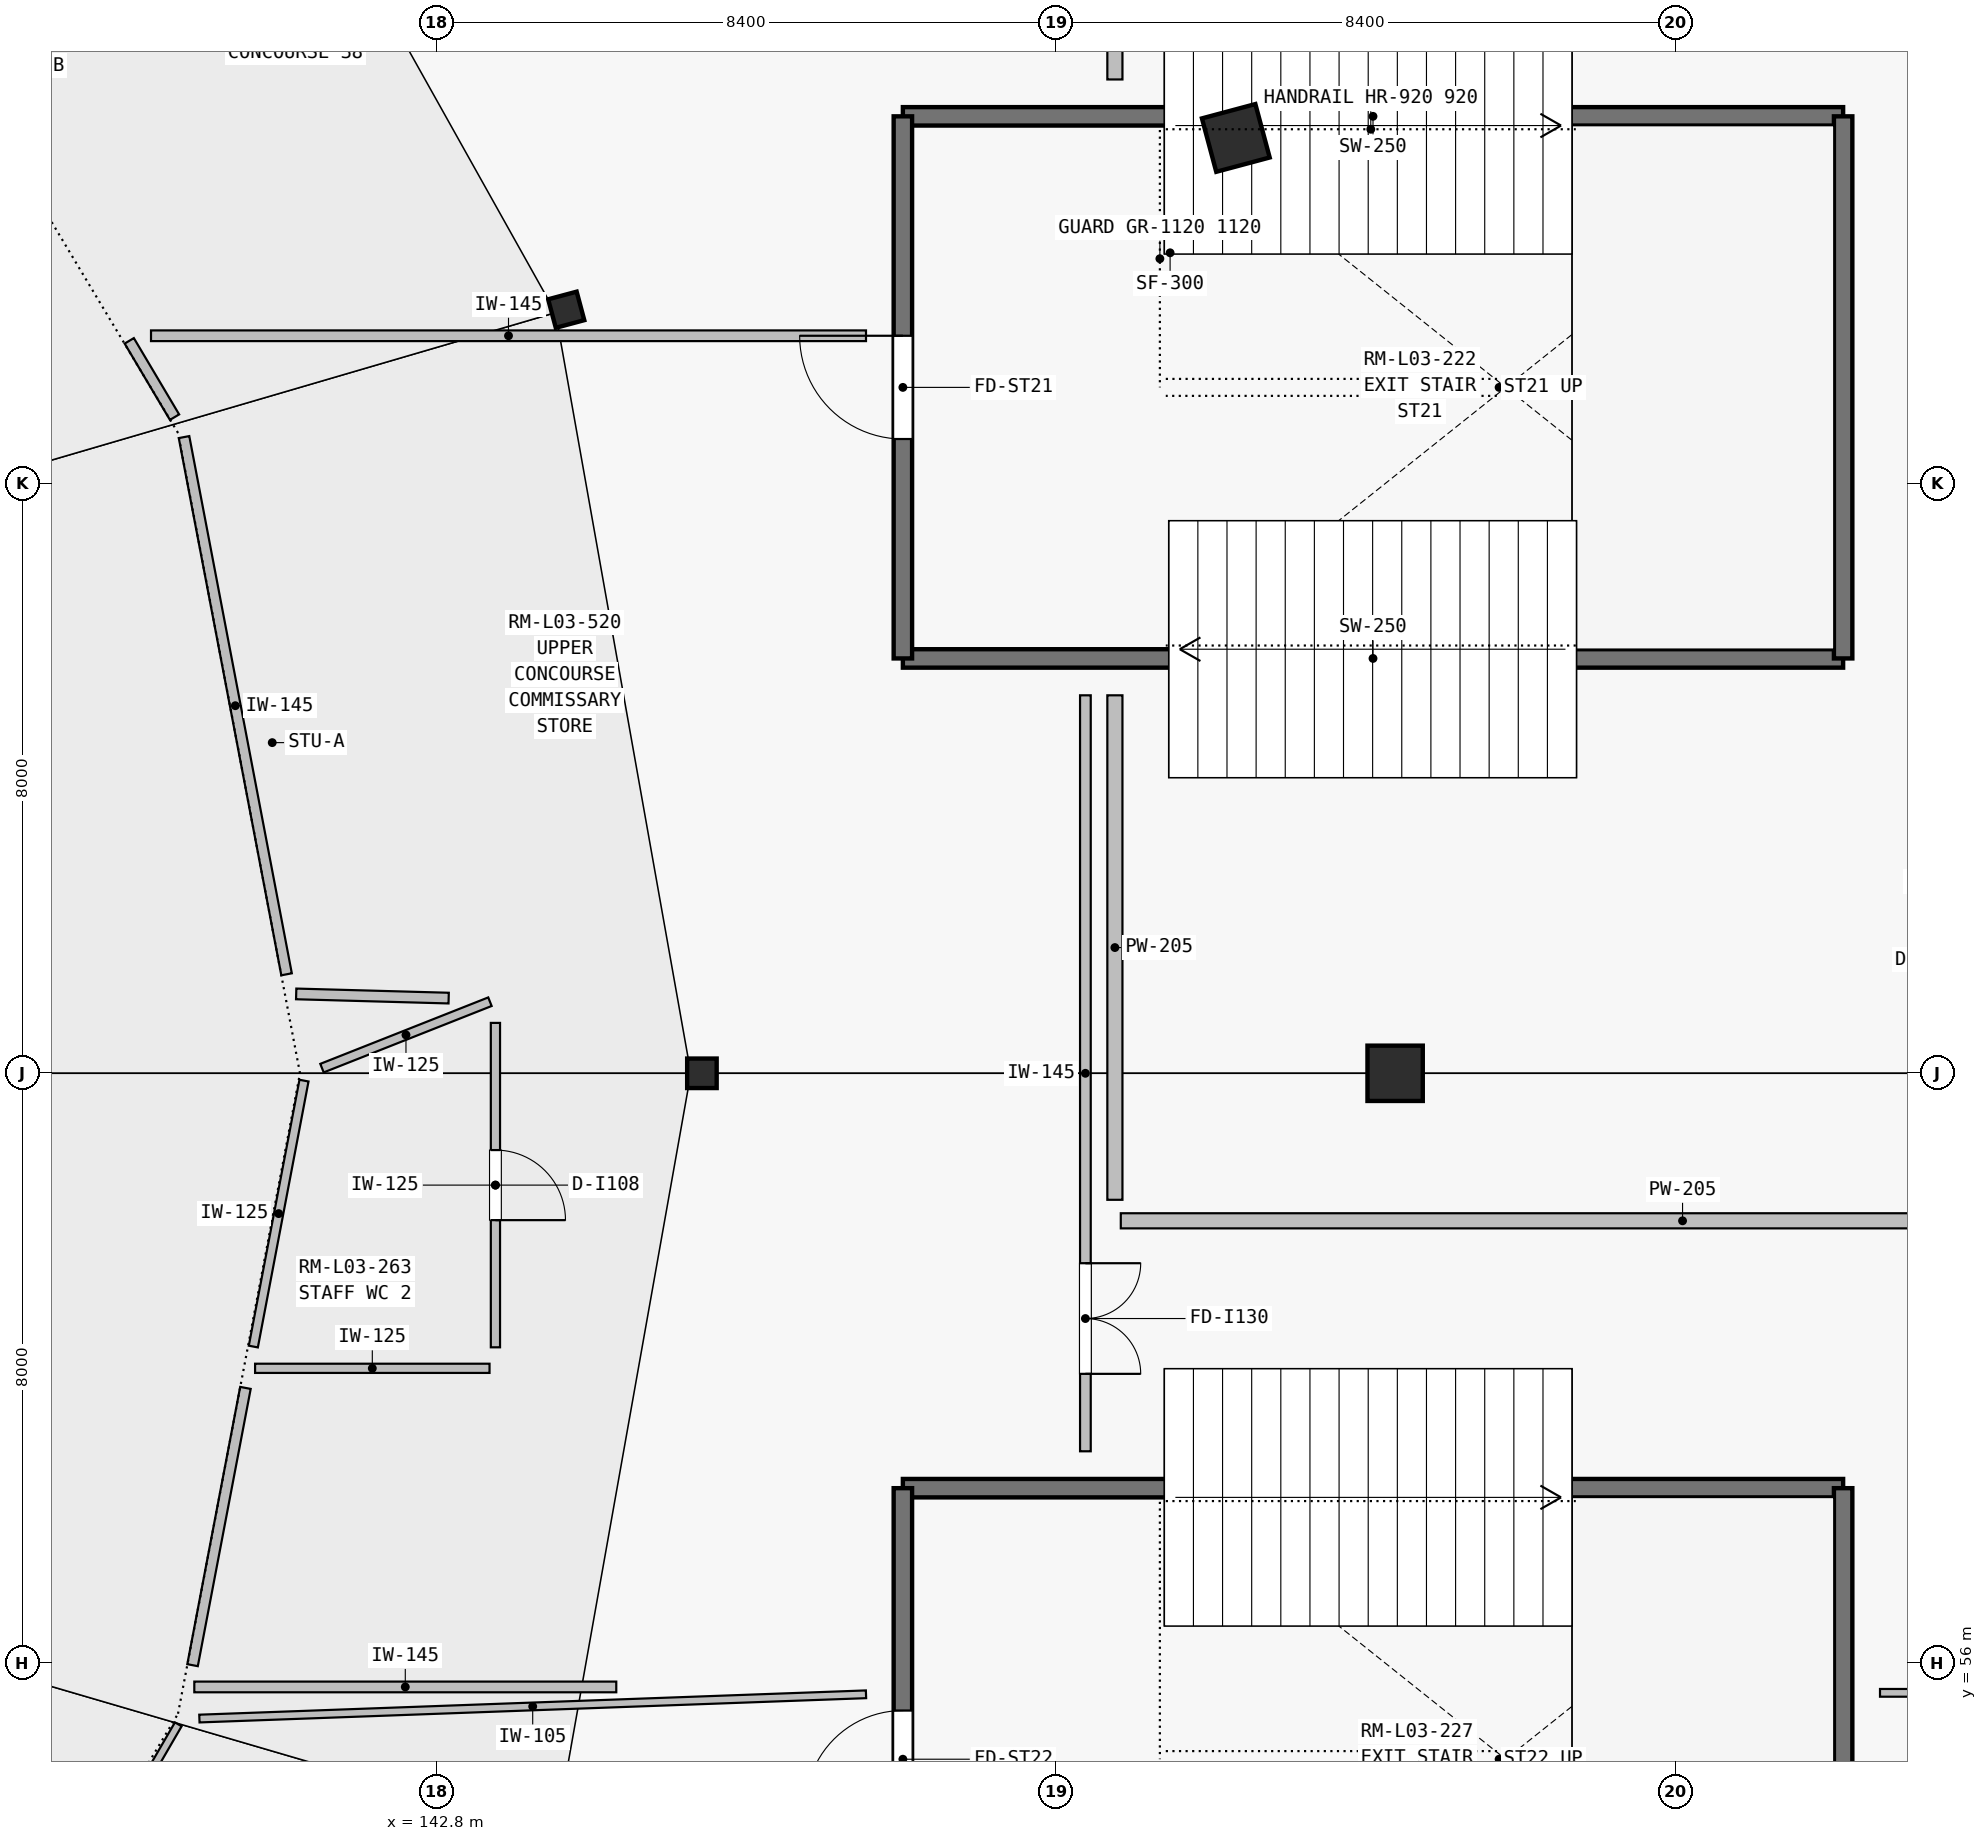
"""IFC4 building model, lengths in metres.
Left out: names, types, materials, properties, quantities, classifications, styles, units other than length and angle.
Written with IfcOpenShell. Run it as: python <this file> out.ifc"""

import sys

from ifc_helpers import new_model, si_unit, direction, frame, frame_2d, origin, origin_2d, place, context, subcontext, project, spatial, rectangle, i_section, extrude, element, fill, save


model = new_model("IFC4")
c1 = context("Model", 3, precision=1e-05, world=origin(), true_north=direction((0.0, 1.0)))
c2 = subcontext(c1, "Body", "Model", "MODEL_VIEW")
j1 = project(units=[si_unit("LENGTHUNIT", "METRE"), si_unit("PLANEANGLEUNIT", "RADIAN")], contexts=[c1])
p1 = place(None, origin())
s1 = spatial("IfcSite", under=j1, at=p1, CompositionType="ELEMENT")
p2 = place(p1, origin())
s2 = spatial("IfcBuilding", under=s1, at=p2, CompositionType="ELEMENT")
p3 = place(p2, frame((0.0, 0.0, 14.4)))
s3 = spatial("IfcBuildingStorey", under=s2, at=p3, CompositionType="ELEMENT", Elevation=14.4)
for number, where, z_axis, x_axis in (
    (1, (146.4, 64.0, 0.0), (0.0, 0.0, 1.0), (1.0, 0.0, 0.0)),
    (2, (144.56, 74.353, 0.0), (0.0, 0.0, 1.0), (0.966, 0.259, 0.0)),
):
    element("IfcColumn", number, at=place(p3, frame(where, z_axis=z_axis, x_axis=x_axis)), inside=s3, PredefinedType="COLUMN", context=c2, shape_type="SweptSolid", body=[
        extrude(i_section(OverallWidth=0.4, OverallDepth=0.4, WebThickness=0.016, FlangeThickness=0.028, at=origin_2d()), origin(), (0.0, 0.0, 1.0), 4.5),
    ])
for number, where, z_axis, x_axis in (
    (3, (155.8, 64.0, 0.0), (0.0, 0.0, 1.0), (1.0, 0.0, 0.0)),
    (4, (153.64, 76.682, 0.0), (0.0, 0.0, 1.0), (0.966, 0.259, 0.0)),
):
    element("IfcColumn", number, at=place(p3, frame(where, z_axis=z_axis, x_axis=x_axis)), inside=s3, PredefinedType="COLUMN", context=c2, shape_type="SweptSolid", body=[
        extrude(rectangle(XDim=0.75, YDim=0.75, at=origin_2d()), origin(), (0.0, 0.0, 1.0), 4.5),
    ])
for number, where, z_axis, x_axis in (
    (5, (149.125, 69.625, 0.0), (0.0, 0.0, 1.0), (1.0, 0.0, 0.0)),
    (6, (149.125, 76.975, 0.0), (0.0, 0.0, 1.0), (1.0, 0.0, 0.0)),
):
    element("IfcWall", number, at=place(p3, frame(where, z_axis=z_axis, x_axis=x_axis)), inside=s3, PredefinedType="SHEAR", context=c2, shape_type="SweptSolid", body=[
        extrude(rectangle(XDim=12.75, YDim=0.25, at=frame_2d((6.375, 0.0))), origin(), (0.0, 0.0, 1.0), 4.5),
    ])
p4 = place(p3, frame((149.125, 69.625, 0.0), z_axis=(0.0, 0.0, 1.0), x_axis=(0.0, 1.0, 0.0)))
e7 = element("IfcWall", 7, at=p4, inside=s3, PredefinedType="SHEAR", context=c2, shape_type="SweptSolid", body=[
    extrude(rectangle(XDim=7.35, YDim=0.25, at=frame_2d((3.675, 0.0))), origin(), (0.0, 0.0, 1.0), 4.5),
])
p5 = place(p4, frame((2.975, 0.0, 0.0)))
e8 = element("IfcOpeningElement", 8, at=p5, cuts=e7, PredefinedType="OPENING", context=c2, shape_type="SweptSolid", body=[
    extrude(rectangle(XDim=1.4, YDim=2.2, at=frame_2d((0.7, 1.1))), frame((0.0, 0.135, 0.0), z_axis=(0.0, -1.0, 0.0), x_axis=(1.0, 0.0, 0.0)), (0.0, 0.0, 1.0), 0.27),
])
p6 = place(p3, frame((161.875, 69.625, 0.0), z_axis=(0.0, 0.0, 1.0), x_axis=(0.0, 1.0, 0.0)))
e9 = element("IfcWall", 9, at=p6, inside=s3, PredefinedType="SHEAR", context=c2, shape_type="SweptSolid", body=[
    extrude(rectangle(XDim=7.35, YDim=0.25, at=frame_2d((3.675, 0.0))), origin(), (0.0, 0.0, 1.0), 4.5),
])
p7 = place(p3, frame((149.125, 58.375, 0.0), z_axis=(0.0, 0.0, 1.0), x_axis=(1.0, 0.0, 0.0)))
e10 = element("IfcWall", 10, at=p7, inside=s3, PredefinedType="SHEAR", context=c2, shape_type="SweptSolid", body=[
    extrude(rectangle(XDim=12.75, YDim=0.25, at=frame_2d((6.375, 0.0))), origin(), (0.0, 0.0, 1.0), 4.5),
])
p8 = place(p3, frame((149.125, 51.025, 0.0), z_axis=(0.0, 0.0, 1.0), x_axis=(0.0, 1.0, 0.0)))
e11 = element("IfcWall", 11, at=p8, inside=s3, PredefinedType="SHEAR", context=c2, shape_type="SweptSolid", body=[
    extrude(rectangle(XDim=7.35, YDim=0.25, at=frame_2d((3.675, 0.0))), origin(), (0.0, 0.0, 1.0), 4.5),
])
p9 = place(p8, frame((3.015, 0.0, 0.0)))
e12 = element("IfcOpeningElement", 12, at=p9, cuts=e11, PredefinedType="OPENING", context=c2, shape_type="SweptSolid", body=[
    extrude(rectangle(XDim=1.32, YDim=2.2, at=frame_2d((0.66, 1.1))), frame((0.0, 0.135, 0.0), z_axis=(0.0, -1.0, 0.0), x_axis=(1.0, 0.0, 0.0)), (0.0, 0.0, 1.0), 0.27),
])
p10 = place(p3, frame((161.875, 51.025, 0.0), z_axis=(0.0, 0.0, 1.0), x_axis=(0.0, 1.0, 0.0)))
e13 = element("IfcWall", 13, at=p10, inside=s3, PredefinedType="SHEAR", context=c2, shape_type="SweptSolid", body=[
    extrude(rectangle(XDim=7.35, YDim=0.25, at=frame_2d((3.675, 0.0))), origin(), (0.0, 0.0, 1.0), 4.5),
])
p11 = place(p3, frame((143.52, 60.0, 0.0), z_axis=(0.0, 0.0, 1.0), x_axis=(-1.0, 0.0, 0.0)))
e14 = element("IfcWall", 14, at=p11, inside=s3, PredefinedType="PARTITIONING", context=c2, shape_type="SweptSolid", body=[
    extrude(rectangle(XDim=3.179, YDim=0.125, at=frame_2d((1.59, 0.0))), origin(), (0.0, 0.0, 1.0), 4.2),
])
p12 = place(p3, frame((140.317, 60.295, 0.0), z_axis=(0.0, 0.0, 1.0), x_axis=(0.187102938602, 0.982340312909, 0.0)))
e15 = element("IfcWall", 15, at=p12, inside=s3, PredefinedType="PARTITIONING", context=c2, shape_type="SweptSolid", body=[
    extrude(rectangle(XDim=3.671, YDim=0.125, at=frame_2d((1.835, 0.0))), origin(), (0.0, 0.0, 1.0), 4.2),
])
p13 = place(p3, frame((141.248, 64.07, 0.0), z_axis=(0.0, 0.0, 1.0), x_axis=(0.929886191802, 0.367847346457, 0.0)))
e16 = element("IfcWall", 16, at=p13, inside=s3, PredefinedType="PARTITIONING", context=c2, shape_type="SweptSolid", body=[
    extrude(rectangle(XDim=2.449, YDim=0.125, at=frame_2d((1.225, 0.0))), origin(), (0.0, 0.0, 1.0), 4.2),
])
p14 = place(p3, frame((143.6, 64.683, 0.0), z_axis=(0.0, 0.0, 1.0), x_axis=(0.0, -1.0, 0.0)))
e17 = element("IfcWall", 17, at=p14, inside=s3, PredefinedType="PARTITIONING", context=c2, shape_type="SweptSolid", body=[
    extrude(rectangle(XDim=4.398, YDim=0.125, at=frame_2d((2.199, 0.0))), origin(), (0.0, 0.0, 1.0), 4.2),
])
p15 = place(p14, frame((1.724, 0.0, 0.0)))
e18 = element("IfcOpeningElement", 18, at=p15, cuts=e17, PredefinedType="OPENING", context=c2, shape_type="SweptSolid", body=[
    extrude(rectangle(XDim=0.95, YDim=2.1, at=frame_2d((0.475, 1.05))), frame((0.0, 0.073, 0.0), z_axis=(0.0, -1.0, 0.0), x_axis=(1.0, 0.0, 0.0)), (0.0, 0.0, 1.0), 0.145),
])
p16 = place(p3, frame((135.684, 48.941, 0.0), z_axis=(0.0, 0.0, 1.0), x_axis=(0.501857543881, 0.864950290855, 0.0)))
e19 = element("IfcWall", 19, at=p16, inside=s3, PredefinedType="PARTITIONING", context=c2, shape_type="SweptSolid", body=[
    extrude(rectangle(XDim=7.205, YDim=0.105, at=frame_2d((3.602, 0.0))), origin(), (0.0, 0.0, 1.0), 4.2),
])
p17 = place(p3, frame((139.586, 55.251, 0.0), z_axis=(0.0, 0.0, 1.0), x_axis=(0.999338874041, 0.036356771461, 0.0)))
e20 = element("IfcWall", 20, at=p17, inside=s3, PredefinedType="PARTITIONING", context=c2, shape_type="SweptSolid", body=[
    extrude(rectangle(XDim=9.045, YDim=0.105, at=frame_2d((4.522, 0.0))), origin(), (0.0, 0.0, 1.0), 2.943),
])
p18 = place(p3, frame((162.375, 55.6, 0.0), z_axis=(0.0, 0.0, 1.0), x_axis=(1.0, 0.0, 0.0)))
e21 = element("IfcWall", 21, at=p18, inside=s3, PredefinedType="PARTITIONING", context=c2, shape_type="SweptSolid", body=[
    extrude(rectangle(XDim=5.145, YDim=0.105, at=frame_2d((2.573, 0.0))), origin(), (0.0, 0.0, 1.0), 3.543),
])
p19 = place(p3, frame((152.0, 77.475, 0.0), z_axis=(0.0, 0.0, 1.0), x_axis=(0.0, 1.0, 0.0)))
e22 = element("IfcWall", 22, at=p19, inside=s3, PredefinedType="SOLIDWALL", context=c2, shape_type="SweptSolid", body=[
    extrude(rectangle(XDim=2.045, YDim=0.205, at=frame_2d((1.022, 0.0))), origin(), (0.0, 0.0, 1.0), 4.2),
])
p20 = place(p3, frame((167.315, 62.0, 0.0), z_axis=(0.0, 0.0, 1.0), x_axis=(-1.0, 0.0, 0.0)))
e23 = element("IfcWall", 23, at=p20, inside=s3, PredefinedType="SOLIDWALL", context=c2, shape_type="SweptSolid", body=[
    extrude(rectangle(XDim=15.235, YDim=0.205, at=frame_2d((7.618, 0.0))), origin(), (0.0, 0.0, 1.0), 3.543),
])
p21 = place(p3, frame((152.0, 62.285, 0.0), z_axis=(0.0, 0.0, 1.0), x_axis=(0.0, 1.0, 0.0)))
e24 = element("IfcWall", 24, at=p21, inside=s3, PredefinedType="SOLIDWALL", context=c2, shape_type="SweptSolid", body=[
    extrude(rectangle(XDim=6.84, YDim=0.205, at=frame_2d((3.42, 0.0))), origin(), (0.0, 0.0, 1.0), 3.695),
])
p22 = place(p3, frame((145.239, 55.68, 0.0), z_axis=(0.0, 0.0, 1.0), x_axis=(-1.0, 0.0, 0.0)))
e25 = element("IfcWall", 25, at=p22, inside=s3, PredefinedType="PARTITIONING", context=c2, shape_type="SweptSolid", body=[
    extrude(rectangle(XDim=5.722, YDim=0.145, at=frame_2d((2.861, 0.0))), origin(), (0.0, 0.0, 1.0), 2.943),
])
p23 = place(p3, frame((139.493, 55.975, 0.0), z_axis=(0.0, 0.0, 1.0), x_axis=(0.187411082395, 0.982281571748, 0.0)))
e26 = element("IfcWall", 26, at=p23, inside=s3, PredefinedType="PARTITIONING", context=c2, shape_type="SweptSolid", body=[
    extrude(rectangle(XDim=3.827, YDim=0.145, at=frame_2d((1.914, 0.0))), origin(), (0.0, 0.0, 1.0), 4.2),
])
p24 = place(p3, frame((142.966, 65.02, 0.0), z_axis=(0.0, 0.0, 1.0), x_axis=(-0.999621756805, 0.027501696698, 0.0)))
e27 = element("IfcWall", 27, at=p24, inside=s3, PredefinedType="PARTITIONING", context=c2, shape_type="SweptSolid", body=[
    extrude(rectangle(XDim=2.068, YDim=0.145, at=frame_2d((1.034, 0.0))), origin(), (0.0, 0.0, 1.0), 4.2),
])
p25 = place(p3, frame((140.768, 65.342, 0.0), z_axis=(0.0, 0.0, 1.0), x_axis=(-0.187497878966, 0.982265007716, 0.0)))
e28 = element("IfcWall", 28, at=p25, inside=s3, PredefinedType="PARTITIONING", context=c2, shape_type="SweptSolid", body=[
    extrude(rectangle(XDim=7.416, YDim=0.145, at=frame_2d((3.708, 0.0))), origin(), (0.0, 0.0, 1.0), 4.2),
])
p26 = place(p3, frame((139.249, 72.896, 0.0), z_axis=(0.0, 0.0, 1.0), x_axis=(-0.51049187439, 0.859882576973, 0.0)))
e29 = element("IfcWall", 29, at=p26, inside=s3, PredefinedType="PARTITIONING", context=c2, shape_type="SweptSolid", body=[
    extrude(rectangle(XDim=1.203, YDim=0.145, at=frame_2d((0.602, 0.0))), origin(), (0.0, 0.0, 1.0), 4.2),
])
p27 = place(p3, frame((138.93, 74.0, 0.0), z_axis=(0.0, 0.0, 1.0), x_axis=(1.0, 0.0, 0.0)))
e30 = element("IfcWall", 30, at=p27, inside=s3, PredefinedType="PARTITIONING", context=c2, shape_type="SweptSolid", body=[
    extrude(rectangle(XDim=9.695, YDim=0.145, at=frame_2d((4.848, 0.0))), origin(), (0.0, 0.0, 1.0), 2.943),
])
p28 = place(p3, frame((151.6, 69.125, 0.0), z_axis=(0.0, 0.0, 1.0), x_axis=(0.0, -1.0, 0.0)))
e31 = element("IfcWall", 31, at=p28, inside=s3, PredefinedType="PARTITIONING", context=c2, shape_type="SweptSolid", body=[
    extrude(rectangle(XDim=10.25, YDim=0.145, at=frame_2d((5.125, 0.0))), origin(), (0.0, 0.0, 1.0), 3.695),
])
p29 = place(p28, frame((7.7, 0.0, 0.0)))
e32 = element("IfcOpeningElement", 32, at=p29, cuts=e31, PredefinedType="OPENING", context=c2, shape_type="SweptSolid", body=[
    extrude(rectangle(XDim=1.5, YDim=2.2, at=frame_2d((0.75, 1.1))), frame((0.0, 0.083, 0.0), z_axis=(0.0, -1.0, 0.0), x_axis=(1.0, 0.0, 0.0)), (0.0, 0.0, 1.0), 0.165),
])
p30 = place(p5, origin())
e33 = element("IfcDoor", 33, at=p30, inside=s3, OperationType="SINGLE_SWING_RIGHT", PredefinedType="DOOR", context=c2, shape_type="SweptSolid", body=[
    extrude(rectangle(XDim=1.4, YDim=2.2, at=frame_2d((0.7, 1.1))), frame((0.0, 0.025, 0.0), z_axis=(0.0, -1.0, 0.0), x_axis=(1.0, 0.0, 0.0)), (0.0, 0.0, 1.0), 0.05),
])
fill(e8, e33)
p31 = place(p9, origin())
e34 = element("IfcDoor", 34, at=p31, inside=s3, OperationType="SINGLE_SWING_LEFT", PredefinedType="DOOR", context=c2, shape_type="SweptSolid", body=[
    extrude(rectangle(XDim=1.32, YDim=2.2, at=frame_2d((0.66, 1.1))), frame((0.0, 0.025, 0.0), z_axis=(0.0, -1.0, 0.0), x_axis=(1.0, 0.0, 0.0)), (0.0, 0.0, 1.0), 0.05),
])
fill(e12, e34)
p32 = place(p15, origin())
e35 = element("IfcDoor", 35, at=p32, inside=s3, OperationType="SINGLE_SWING_RIGHT", PredefinedType="DOOR", context=c2, shape_type="SweptSolid", body=[
    extrude(rectangle(XDim=0.95, YDim=2.1, at=frame_2d((0.475, 1.05))), frame((0.0, 0.025, 0.0), z_axis=(0.0, -1.0, 0.0), x_axis=(1.0, 0.0, 0.0)), (0.0, 0.0, 1.0), 0.05),
])
fill(e18, e35)
p33 = place(p29, origin())
e36 = element("IfcDoor", 36, at=p33, inside=s3, OperationType="DOUBLE_DOOR_SINGLE_SWING", PredefinedType="DOOR", context=c2, shape_type="SweptSolid", body=[
    extrude(rectangle(XDim=1.5, YDim=2.2, at=frame_2d((0.75, 1.1))), frame((0.0, 0.025, 0.0), z_axis=(0.0, -1.0, 0.0), x_axis=(1.0, 0.0, 0.0)), (0.0, 0.0, 1.0), 0.05),
])
fill(e32, e36)
save(model, sys.argv[1])
